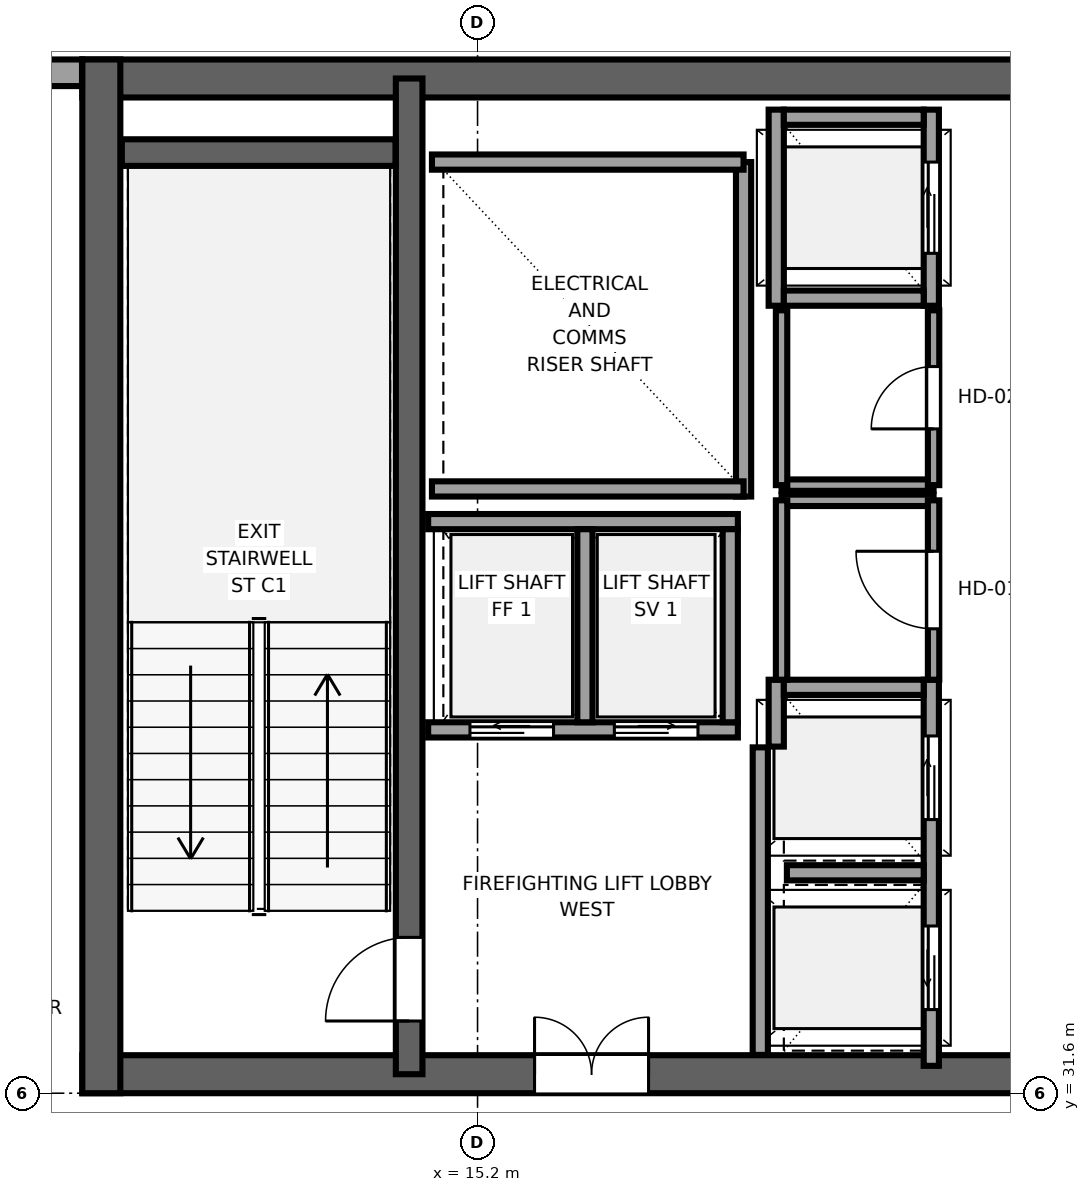
"""IFC4 building model, lengths in metres.
Left out: names, types, materials, properties, quantities, classifications, styles, units other than length and angle.
Written with IfcOpenShell. Run it as: python <this file> out.ifc"""

import sys

from ifc_helpers import new_model, si_unit, direction, frame, frame_2d, origin, place, context, subcontext, project, spatial, rectangle, extrude, source, transform, mapped, element, fill, save


model = new_model("IFC4")
c1 = context("Model", 3, precision=1e-05, world=origin(), true_north=direction((0.0, 1.0)))
c2 = subcontext(c1, "Body", "Model", "MODEL_VIEW")
j1 = project(units=[si_unit("LENGTHUNIT", "METRE"), si_unit("PLANEANGLEUNIT", "RADIAN")], contexts=[c1])
p1 = place(None, origin())
s1 = spatial("IfcSite", under=j1, at=p1, CompositionType="ELEMENT")
p2 = place(p1, origin())
s2 = spatial("IfcBuilding", under=s1, at=p2, CompositionType="ELEMENT")
p3 = place(p2, frame((0.0, 0.0, 286.55)))
s3 = spatial("IfcBuildingStorey", under=s2, at=p3, CompositionType="ELEMENT", Elevation=286.55)
p4 = place(p3, frame((10.0, 31.85, 0.0), z_axis=(0.0, 0.0, 1.0), x_axis=(1.0, 0.0, 0.0)))
e1 = element("IfcWall", 1, at=p4, inside=s3, PredefinedType="SHEAR", context=c2, shape_type="SweptSolid", body=[
    extrude(rectangle(XDim=26.0, YDim=0.5, at=frame_2d((13.0, 0.0))), origin(), (0.0, 0.0, 1.0), 4.4),
])
p5 = place(p4, frame((7.45, 0.0, 0.0), z_axis=(0.0, 0.0, 1.0), x_axis=(-1.0, 0.0, 0.0)))
e2 = element("IfcOpeningElement", 2, at=p5, cuts=e1, PredefinedType="OPENING", context=c2, shape_type="SweptSolid", body=[
    extrude(rectangle(XDim=1.5, YDim=2.04, at=frame_2d((0.75, 1.02))), frame((0.0, 0.26, 0.0), z_axis=(0.0, -1.0, 0.0), x_axis=(1.0, 0.0, 0.0)), (0.0, 0.0, 1.0), 0.52),
])
p6 = place(p4, frame((13.75, 0.0, 0.0), z_axis=(0.0, 0.0, 1.0), x_axis=(-1.0, 0.0, 0.0)))
e3 = element("IfcOpeningElement", 3, at=p6, cuts=e1, PredefinedType="OPENING", context=c2, shape_type="SweptSolid", body=[
    extrude(rectangle(XDim=1.5, YDim=2.04, at=frame_2d((0.75, 1.02))), frame((0.0, 0.26, 0.0), z_axis=(0.0, -1.0, 0.0), x_axis=(1.0, 0.0, 0.0)), (0.0, 0.0, 1.0), 0.52),
])
p7 = place(p4, frame((20.05, 0.0, 0.0), z_axis=(0.0, 0.0, 1.0), x_axis=(-1.0, 0.0, 0.0)))
e4 = element("IfcOpeningElement", 4, at=p7, cuts=e1, PredefinedType="OPENING", context=c2, shape_type="SweptSolid", body=[
    extrude(rectangle(XDim=1.5, YDim=2.04, at=frame_2d((0.75, 1.02))), frame((0.0, 0.26, 0.0), z_axis=(0.0, -1.0, 0.0), x_axis=(1.0, 0.0, 0.0)), (0.0, 0.0, 1.0), 0.52),
])
p8 = place(p3, frame((10.0, 44.95, 0.0), z_axis=(0.0, 0.0, 1.0), x_axis=(1.0, 0.0, 0.0)))
e5 = element("IfcWall", 5, at=p8, inside=s3, PredefinedType="SHEAR", context=c2, shape_type="SweptSolid", body=[
    extrude(rectangle(XDim=26.0, YDim=0.5, at=frame_2d((13.0, 0.0))), origin(), (0.0, 0.0, 1.0), 4.4),
])
p9 = place(p3, frame((10.25, 31.6, 0.0), z_axis=(0.0, 0.0, 1.0), x_axis=(0.0, 1.0, 0.0)))
e6 = element("IfcWall", 6, at=p9, inside=s3, PredefinedType="SHEAR", context=c2, shape_type="SweptSolid", body=[
    extrude(rectangle(XDim=13.6, YDim=0.5, at=frame_2d((6.8, 0.0))), origin(), (0.0, 0.0, 1.0), 4.4),
])
p10 = place(p3, frame((14.3, 31.85, 0.0), z_axis=(0.0, 0.0, 1.0), x_axis=(0.0, 1.0, 0.0)))
e7 = element("IfcWall", 7, at=p10, inside=s3, PredefinedType="SHEAR", context=c2, shape_type="SweptSolid", body=[
    extrude(rectangle(XDim=13.1, YDim=0.35, at=frame_2d((6.55, 0.0))), origin(), (0.0, 0.0, 1.0), 4.4),
])
p11 = place(p10, frame((0.7, 0.0, 0.0)))
e8 = element("IfcOpeningElement", 8, at=p11, cuts=e7, PredefinedType="OPENING", context=c2, shape_type="SweptSolid", body=[
    extrude(rectangle(XDim=1.1, YDim=2.12, at=frame_2d((0.55, 1.06))), frame((0.0, 0.185, 0.0), z_axis=(0.0, -1.0, 0.0), x_axis=(1.0, 0.0, 0.0)), (0.0, 0.0, 1.0), 0.37),
])
p12 = place(p3, frame((10.52, 43.975, 0.0), z_axis=(0.0, 0.0, 1.0), x_axis=(1.0, 0.0, 0.0)))
e9 = element("IfcWall", 9, at=p12, inside=s3, PredefinedType="SHEAR", context=c2, shape_type="SweptSolid", body=[
    extrude(rectangle(XDim=3.6, YDim=0.35, at=frame_2d((1.8, 0.0))), origin(), (0.0, 0.0, 1.0), 4.4),
])
p13 = place(p3, frame((9.996, 45.025, 0.0), z_axis=(0.0, 0.0, 1.0), x_axis=(-1.0, 0.0, 0.0)))
e10 = element("IfcWall", 10, at=p13, inside=s3, PredefinedType="SOLIDWALL", context=c2, shape_type="SweptSolid", body=[
    extrude(rectangle(XDim=2.979, YDim=0.35, at=frame_2d((1.49, 0.0))), origin(), (0.0, 0.0, 1.0), 2.93),
])
p14 = place(p3, frame((18.7, 39.45, 0.0), z_axis=(0.0, 0.0, 1.0), x_axis=(0.0, 1.0, 0.0)))
e11 = element("IfcWall", 11, at=p14, inside=s3, PredefinedType="SOLIDWALL", context=c2, shape_type="SweptSolid", body=[
    extrude(rectangle(XDim=4.4, YDim=0.2, at=frame_2d((2.2, 0.0))), origin(), (0.0, 0.0, 1.0), 4.14),
])
for number, where, z_axis, x_axis in (
    (12, (14.6, 39.55, 0.0), (0.0, 0.0, 1.0), (1.0, 0.0, 0.0)),
    (13, (14.6, 43.85, 0.0), (0.0, 0.0, 1.0), (1.0, 0.0, 0.0)),
):
    element("IfcWall", number, at=place(p3, frame(where, z_axis=z_axis, x_axis=x_axis)), inside=s3, PredefinedType="SOLIDWALL", context=c2, shape_type="SweptSolid", body=[
        extrude(rectangle(XDim=4.1, YDim=0.2, at=frame_2d((2.05, 0.0))), origin(), (0.0, 0.0, 1.0), 4.14),
    ])
p15 = place(p3, frame((18.92, 32.104, 0.0), z_axis=(0.0, 0.0, 1.0), x_axis=(0.0, 1.0, 0.0)))
e14 = element("IfcWall", 14, at=p15, inside=s3, PredefinedType="SOLIDWALL", context=c2, shape_type="SweptSolid", body=[
    extrude(rectangle(XDim=4.046, YDim=0.2, at=frame_2d((2.023, 0.0))), origin(), (0.0, 0.0, 1.0), 4.14),
])
p16 = place(p3, frame((21.17, 31.96, 0.0), z_axis=(0.0, 0.0, 1.0), x_axis=(0.0, 1.0, 0.0)))
e15 = element("IfcWall", 15, at=p16, inside=s3, PredefinedType="SOLIDWALL", context=c2, shape_type="SweptSolid", body=[
    extrude(rectangle(XDim=5.08, YDim=0.2, at=frame_2d((2.54, 0.0))), origin(), (0.0, 0.0, 1.0), 4.14),
])
p17 = place(p16, frame((0.74, 0.0, 0.0)))
e16 = element("IfcOpeningElement", 16, at=p17, cuts=e15, PredefinedType="OPENING", context=c2, shape_type="SweptSolid", body=[
    extrude(rectangle(XDim=1.1, YDim=2.12, at=frame_2d((0.55, 1.06))), frame((0.0, 0.11, 0.0), z_axis=(0.0, -1.0, 0.0), x_axis=(1.0, 0.0, 0.0)), (0.0, 0.0, 1.0), 0.22),
])
p18 = place(p16, frame((3.24, 0.0, 0.0)))
e17 = element("IfcOpeningElement", 17, at=p18, cuts=e15, PredefinedType="OPENING", context=c2, shape_type="SweptSolid", body=[
    extrude(rectangle(XDim=1.1, YDim=2.12, at=frame_2d((0.55, 1.06))), frame((0.0, 0.11, 0.0), z_axis=(0.0, -1.0, 0.0), x_axis=(1.0, 0.0, 0.0)), (0.0, 0.0, 1.0), 0.22),
])
p19 = place(p3, frame((19.13, 36.16, 0.0), z_axis=(0.0, 0.0, 1.0), x_axis=(0.0, 1.0, 0.0)))
e18 = element("IfcWall", 18, at=p19, inside=s3, PredefinedType="SOLIDWALL", context=c2, shape_type="SweptSolid", body=[
    extrude(rectangle(XDim=0.88, YDim=0.2, at=frame_2d((0.44, 0.0))), origin(), (0.0, 0.0, 1.0), 4.14),
])
p20 = place(p3, frame((19.23, 36.94, 0.0), z_axis=(0.0, 0.0, 1.0), x_axis=(1.0, 0.0, 0.0)))
e19 = element("IfcWall", 19, at=p20, inside=s3, PredefinedType="SOLIDWALL", context=c2, shape_type="SweptSolid", body=[
    extrude(rectangle(XDim=1.84, YDim=0.2, at=frame_2d((0.92, 0.0))), origin(), (0.0, 0.0, 1.0), 4.14),
])
p21 = place(p3, frame((19.27, 34.5, 0.0), z_axis=(0.0, 0.0, 1.0), x_axis=(1.0, 0.0, 0.0)))
e20 = element("IfcWall", 20, at=p21, inside=s3, PredefinedType="SOLIDWALL", context=c2, shape_type="SweptSolid", body=[
    extrude(rectangle(XDim=1.8, YDim=0.2, at=frame_2d((0.9, 0.0))), origin(), (0.0, 0.0, 1.0), 4.14),
])
p22 = place(p3, frame((21.17, 41.96, 0.0), z_axis=(0.0, 0.0, 1.0), x_axis=(0.0, 1.0, 0.0)))
e21 = element("IfcWall", 21, at=p22, inside=s3, PredefinedType="SOLIDWALL", context=c2, shape_type="SweptSolid", body=[
    extrude(rectangle(XDim=2.58, YDim=0.2, at=frame_2d((1.29, 0.0))), origin(), (0.0, 0.0, 1.0), 4.14),
])
p23 = place(p22, frame((0.69, 0.0, 0.0)))
e22 = element("IfcOpeningElement", 22, at=p23, cuts=e21, PredefinedType="OPENING", context=c2, shape_type="SweptSolid", body=[
    extrude(rectangle(XDim=1.2, YDim=2.15, at=frame_2d((0.6, 1.075))), frame((0.0, 0.11, 0.0), z_axis=(0.0, -1.0, 0.0), x_axis=(1.0, 0.0, 0.0)), (0.0, 0.0, 1.0), 0.22),
])
p24 = place(p3, frame((19.13, 41.96, 0.0), z_axis=(0.0, 0.0, 1.0), x_axis=(0.0, 1.0, 0.0)))
e23 = element("IfcWall", 23, at=p24, inside=s3, PredefinedType="SOLIDWALL", context=c2, shape_type="SweptSolid", body=[
    extrude(rectangle(XDim=2.58, YDim=0.2, at=frame_2d((1.29, 0.0))), origin(), (0.0, 0.0, 1.0), 4.14),
])
for number, where, z_axis, x_axis in (
    (24, (19.23, 42.06, 0.0), (0.0, 0.0, 1.0), (1.0, 0.0, 0.0)),
    (25, (19.23, 44.44, 0.0), (0.0, 0.0, 1.0), (1.0, 0.0, 0.0)),
):
    element("IfcWall", number, at=place(p3, frame(where, z_axis=z_axis, x_axis=x_axis)), inside=s3, PredefinedType="SOLIDWALL", context=c2, shape_type="SweptSolid", body=[
        extrude(rectangle(XDim=1.84, YDim=0.2, at=frame_2d((0.92, 0.0))), origin(), (0.0, 0.0, 1.0), 4.14),
    ])
p25 = place(p3, frame((14.55, 36.38, 0.0), z_axis=(0.0, 0.0, 1.0), x_axis=(1.0, 0.0, 0.0)))
e26 = element("IfcWall", 26, at=p25, inside=s3, PredefinedType="SOLIDWALL", context=c2, shape_type="SweptSolid", body=[
    extrude(rectangle(XDim=4.075, YDim=0.2, at=frame_2d((2.038, 0.0))), origin(), (0.0, 0.0, 1.0), 4.14),
])
p26 = place(p25, frame((0.55, 0.0, 0.0)))
e27 = element("IfcOpeningElement", 27, at=p26, cuts=e26, PredefinedType="OPENING", context=c2, shape_type="SweptSolid", body=[
    extrude(rectangle(XDim=1.1, YDim=2.12, at=frame_2d((0.55, 1.06))), frame((0.0, 0.11, 0.0), z_axis=(0.0, -1.0, 0.0), x_axis=(1.0, 0.0, 0.0)), (0.0, 0.0, 1.0), 0.22),
])
p27 = place(p25, frame((2.45, 0.0, 0.0)))
e28 = element("IfcOpeningElement", 28, at=p27, cuts=e26, PredefinedType="OPENING", context=c2, shape_type="SweptSolid", body=[
    extrude(rectangle(XDim=1.1, YDim=2.12, at=frame_2d((0.55, 1.06))), frame((0.0, 0.11, 0.0), z_axis=(0.0, -1.0, 0.0), x_axis=(1.0, 0.0, 0.0)), (0.0, 0.0, 1.0), 0.22),
])
p28 = place(p3, frame((14.55, 39.12, 0.0), z_axis=(0.0, 0.0, 1.0), x_axis=(1.0, 0.0, 0.0)))
e29 = element("IfcWall", 29, at=p28, inside=s3, PredefinedType="SOLIDWALL", context=c2, shape_type="SweptSolid", body=[
    extrude(rectangle(XDim=4.075, YDim=0.2, at=frame_2d((2.038, 0.0))), origin(), (0.0, 0.0, 1.0), 4.14),
])
for number, where, z_axis, x_axis in (
    (30, (18.525, 36.48, 0.0), (0.0, 0.0, 1.0), (0.0, 1.0, 0.0)),
    (31, (16.613, 36.48, 0.0), (0.0, 0.0, 1.0), (0.0, 1.0, 0.0)),
):
    element("IfcWall", number, at=place(p3, frame(where, z_axis=z_axis, x_axis=x_axis)), inside=s3, PredefinedType="SOLIDWALL", context=c2, shape_type="SweptSolid", body=[
        extrude(rectangle(XDim=2.54, YDim=0.2, at=frame_2d((1.27, 0.0))), origin(), (0.0, 0.0, 1.0), 4.14),
    ])
p29 = place(p3, frame((19.2, 39.4, 0.0), z_axis=(0.0, 0.0, 1.0), x_axis=(1.0, 0.0, 0.0)))
e32 = element("IfcWall", 32, at=p29, inside=s3, PredefinedType="PARTITIONING", context=c2, shape_type="SweptSolid", body=[
    extrude(rectangle(XDim=2.0, YDim=0.15, at=frame_2d((1.0, 0.0))), origin(), (0.0, 0.0, 1.0), 4.14),
])
p30 = place(p3, frame((19.2, 37.04, 0.0), z_axis=(0.0, 0.0, 1.0), x_axis=(0.0, 1.0, 0.0)))
e33 = element("IfcWall", 33, at=p30, inside=s3, PredefinedType="PARTITIONING", context=c2, shape_type="SweptSolid", body=[
    extrude(rectangle(XDim=2.36, YDim=0.15, at=frame_2d((1.18, 0.0))), origin(), (0.0, 0.0, 1.0), 4.14),
])
p31 = place(p3, frame((21.2, 37.04, 0.0), z_axis=(0.0, 0.0, 1.0), x_axis=(0.0, 1.0, 0.0)))
e34 = element("IfcWall", 34, at=p31, inside=s3, PredefinedType="PARTITIONING", context=c2, shape_type="SweptSolid", body=[
    extrude(rectangle(XDim=2.36, YDim=0.15, at=frame_2d((1.18, 0.0))), origin(), (0.0, 0.0, 1.0), 4.14),
])
p32 = place(p31, frame((0.67, 0.0, 0.0)))
e35 = element("IfcOpeningElement", 35, at=p32, cuts=e34, PredefinedType="OPENING", context=c2, shape_type="SweptSolid", body=[
    extrude(rectangle(XDim=1.02, YDim=2.03, at=frame_2d((0.51, 1.015))), frame((0.0, 0.085, 0.0), z_axis=(0.0, -1.0, 0.0), x_axis=(1.0, 0.0, 0.0)), (0.0, 0.0, 1.0), 0.17),
])
p33 = place(p3, frame((19.2, 39.6, 0.0), z_axis=(0.0, 0.0, 1.0), x_axis=(1.0, 0.0, 0.0)))
e36 = element("IfcWall", 36, at=p33, inside=s3, PredefinedType="PARTITIONING", context=c2, shape_type="SweptSolid", body=[
    extrude(rectangle(XDim=2.0, YDim=0.15, at=frame_2d((1.0, 0.0))), origin(), (0.0, 0.0, 1.0), 4.14),
])
p34 = place(p3, frame((19.2, 39.6, 0.0), z_axis=(0.0, 0.0, 1.0), x_axis=(0.0, 1.0, 0.0)))
e37 = element("IfcWall", 37, at=p34, inside=s3, PredefinedType="PARTITIONING", context=c2, shape_type="SweptSolid", body=[
    extrude(rectangle(XDim=2.3, YDim=0.15, at=frame_2d((1.15, 0.0))), origin(), (0.0, 0.0, 1.0), 4.14),
])
p35 = place(p3, frame((21.2, 39.6, 0.0), z_axis=(0.0, 0.0, 1.0), x_axis=(0.0, 1.0, 0.0)))
e38 = element("IfcWall", 38, at=p35, inside=s3, PredefinedType="PARTITIONING", context=c2, shape_type="SweptSolid", body=[
    extrude(rectangle(XDim=2.3, YDim=0.15, at=frame_2d((1.15, 0.0))), origin(), (0.0, 0.0, 1.0), 4.14),
])
p36 = place(p35, frame((0.74, 0.0, 0.0)))
e39 = element("IfcOpeningElement", 39, at=p36, cuts=e38, PredefinedType="OPENING", context=c2, shape_type="SweptSolid", body=[
    extrude(rectangle(XDim=0.82, YDim=2.01, at=frame_2d((0.41, 1.005))), frame((0.0, 0.085, 0.0), z_axis=(0.0, -1.0, 0.0), x_axis=(1.0, 0.0, 0.0)), (0.0, 0.0, 1.0), 0.17),
])
m1 = source(origin(), c2, "Body", "SweptSolid", [
    extrude(rectangle(XDim=1.1, YDim=2.12, at=frame_2d((0.55, 1.06))), frame((0.0, 0.025, 0.0), z_axis=(0.0, -1.0, 0.0), x_axis=(1.0, 0.0, 0.0)), (0.0, 0.0, 1.0), 0.05),
])
p37 = place(p11, origin())
e40 = element("IfcDoor", 40, at=p37, inside=s3, OperationType="SINGLE_SWING_LEFT", PredefinedType="DOOR", context=c2, shape_type="MappedRepresentation", body=[
    mapped(m1, transform((0.0, 0.0, 0.0), x_axis=(1.0, 0.0, 0.0), y_axis=(0.0, 1.0, 0.0), z_axis=(0.0, 0.0, 1.0), scale=1.0)),
])
fill(e8, e40)
m2 = source(origin(), c2, "Body", "SweptSolid", [
    extrude(rectangle(XDim=1.5, YDim=2.04, at=frame_2d((0.75, 1.02))), frame((0.0, 0.025, 0.0), z_axis=(0.0, -1.0, 0.0), x_axis=(1.0, 0.0, 0.0)), (0.0, 0.0, 1.0), 0.05),
])
p38 = place(p5, origin())
e41 = element("IfcDoor", 41, at=p38, inside=s3, OperationType="DOUBLE_DOOR_SINGLE_SWING", PredefinedType="DOOR", context=c2, shape_type="MappedRepresentation", body=[
    mapped(m2, transform((0.0, 0.0, 0.0), x_axis=(1.0, 0.0, 0.0), y_axis=(0.0, 1.0, 0.0), z_axis=(0.0, 0.0, 1.0), scale=1.0)),
])
fill(e2, e41)
m3 = source(origin(), c2, "Body", "SweptSolid", [
    extrude(rectangle(XDim=1.1, YDim=2.12, at=frame_2d((0.55, 1.06))), frame((0.0, 0.025, 0.0), z_axis=(0.0, -1.0, 0.0), x_axis=(1.0, 0.0, 0.0)), (0.0, 0.0, 1.0), 0.05),
])
p39 = place(p17, origin())
e42 = element("IfcDoor", 42, at=p39, inside=s3, OperationType="SLIDING_TO_LEFT", PredefinedType="DOOR", context=c2, shape_type="MappedRepresentation", body=[
    mapped(m3, transform((0.0, 0.0, 0.0), x_axis=(1.0, 0.0, 0.0), y_axis=(0.0, 1.0, 0.0), z_axis=(0.0, 0.0, 1.0), scale=1.0)),
])
fill(e16, e42)
p40 = place(p18, origin())
e43 = element("IfcDoor", 43, at=p40, inside=s3, OperationType="SLIDING_TO_RIGHT", PredefinedType="DOOR", context=c2, shape_type="MappedRepresentation", body=[
    mapped(m3, transform((0.0, 0.0, 0.0), x_axis=(1.0, 0.0, 0.0), y_axis=(0.0, 1.0, 0.0), z_axis=(0.0, 0.0, 1.0), scale=1.0)),
])
fill(e17, e43)
m4 = source(origin(), c2, "Body", "SweptSolid", [
    extrude(rectangle(XDim=1.2, YDim=2.15, at=frame_2d((0.6, 1.075))), frame((0.0, 0.025, 0.0), z_axis=(0.0, -1.0, 0.0), x_axis=(1.0, 0.0, 0.0)), (0.0, 0.0, 1.0), 0.05),
])
p41 = place(p23, origin())
e44 = element("IfcDoor", 44, at=p41, inside=s3, OperationType="SLIDING_TO_RIGHT", PredefinedType="DOOR", context=c2, shape_type="MappedRepresentation", body=[
    mapped(m4, transform((0.0, 0.0, 0.0), x_axis=(1.0, 0.0, 0.0), y_axis=(0.0, 1.0, 0.0), z_axis=(0.0, 0.0, 1.0), scale=1.0)),
])
fill(e22, e44)
p42 = place(p26, origin())
e45 = element("IfcDoor", 45, at=p42, inside=s3, OperationType="SLIDING_TO_LEFT", PredefinedType="DOOR", context=c2, shape_type="MappedRepresentation", body=[
    mapped(m3, transform((0.0, 0.0, 0.0), x_axis=(1.0, 0.0, 0.0), y_axis=(0.0, 1.0, 0.0), z_axis=(0.0, 0.0, 1.0), scale=1.0)),
])
fill(e27, e45)
p43 = place(p27, origin())
e46 = element("IfcDoor", 46, at=p43, inside=s3, OperationType="SLIDING_TO_RIGHT", PredefinedType="DOOR", context=c2, shape_type="MappedRepresentation", body=[
    mapped(m3, transform((0.0, 0.0, 0.0), x_axis=(1.0, 0.0, 0.0), y_axis=(0.0, 1.0, 0.0), z_axis=(0.0, 0.0, 1.0), scale=1.0)),
])
fill(e28, e46)
m5 = source(origin(), c2, "Body", "SweptSolid", [
    extrude(rectangle(XDim=1.02, YDim=2.03, at=frame_2d((0.51, 1.015))), frame((0.0, 0.025, 0.0), z_axis=(0.0, -1.0, 0.0), x_axis=(1.0, 0.0, 0.0)), (0.0, 0.0, 1.0), 0.05),
])
p44 = place(p32, origin())
e47 = element("IfcDoor", 47, at=p44, inside=s3, OperationType="SINGLE_SWING_RIGHT", PredefinedType="DOOR", context=c2, shape_type="MappedRepresentation", body=[
    mapped(m5, transform((0.0, 0.0, 0.0), x_axis=(1.0, 0.0, 0.0), y_axis=(0.0, 1.0, 0.0), z_axis=(0.0, 0.0, 1.0), scale=1.0)),
])
fill(e35, e47)
m6 = source(origin(), c2, "Body", "SweptSolid", [
    extrude(rectangle(XDim=0.82, YDim=2.01, at=frame_2d((0.41, 1.005))), frame((0.0, 0.025, 0.0), z_axis=(0.0, -1.0, 0.0), x_axis=(1.0, 0.0, 0.0)), (0.0, 0.0, 1.0), 0.05),
])
p45 = place(p36, origin())
e48 = element("IfcDoor", 48, at=p45, inside=s3, OperationType="SINGLE_SWING_LEFT", PredefinedType="DOOR", context=c2, shape_type="MappedRepresentation", body=[
    mapped(m6, transform((0.0, 0.0, 0.0), x_axis=(1.0, 0.0, 0.0), y_axis=(0.0, 1.0, 0.0), z_axis=(0.0, 0.0, 1.0), scale=1.0)),
])
fill(e39, e48)
save(model, sys.argv[1])
